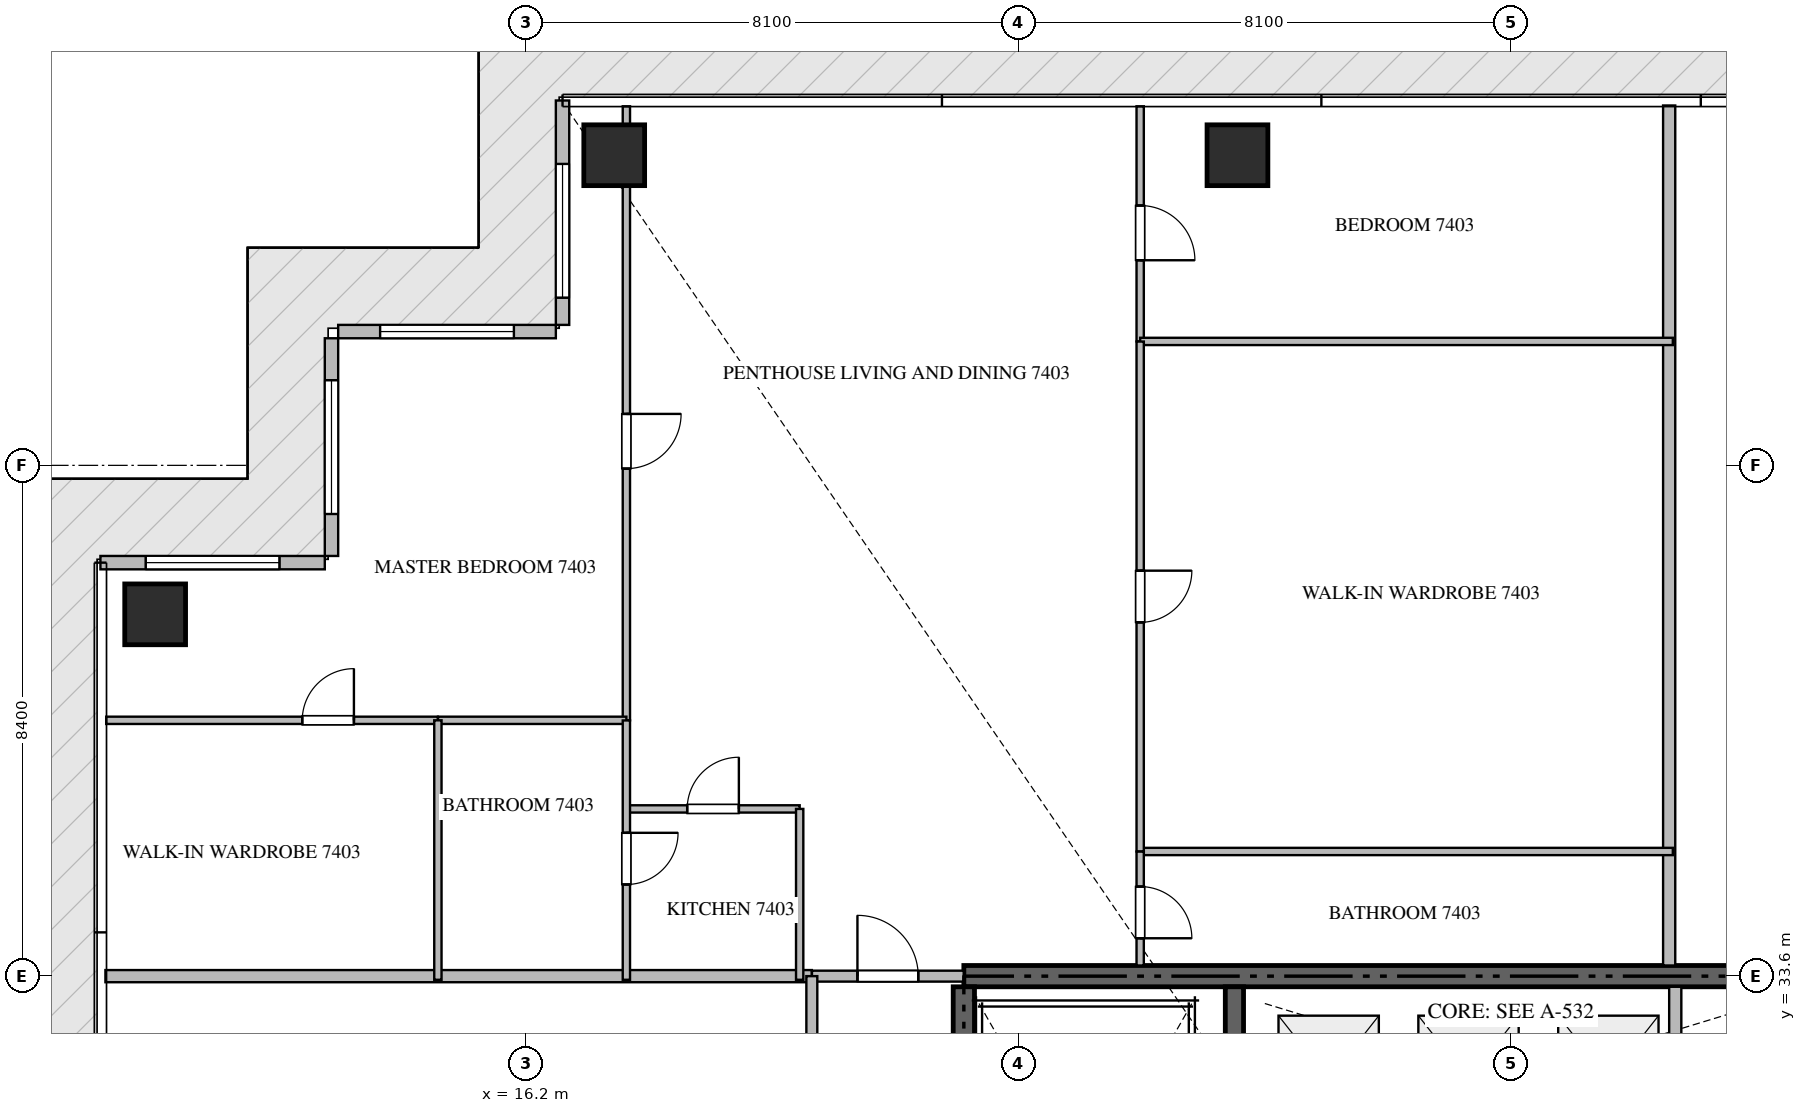
"""IFC4 building model, lengths in metres.
Left out: names, types, materials, properties, quantities, classifications, styles, units other than length and angle.
Written with IfcOpenShell. Run it as: python <this file> out.ifc"""

import sys

from ifc_helpers import new_model, si_unit, direction, frame, frame_2d, origin, origin_2d, place, context, subcontext, project, spatial, rectangle, extrude, source, transform, mapped, element, fill, save


model = new_model("IFC4")
c1 = context("Model", 3, precision=1e-05, world=origin(), true_north=direction((0.0, 1.0)))
c2 = subcontext(c1, "Body", "Model", "MODEL_VIEW")
j1 = project(units=[si_unit("LENGTHUNIT", "METRE"), si_unit("PLANEANGLEUNIT", "RADIAN")], contexts=[c1])
p1 = place(None, origin())
s1 = spatial("IfcSite", under=j1, at=p1, CompositionType="ELEMENT")
p2 = place(p1, origin())
s2 = spatial("IfcBuilding", under=s1, at=p2, CompositionType="ELEMENT")
p3 = place(p2, frame((0.0, 0.0, 297.5)))
s3 = spatial("IfcBuildingStorey", under=s2, at=p3, CompositionType="ELEMENT", Elevation=297.5)
p4 = place(p3, frame((41.4, 33.6, -0.26), z_axis=(0.0, 0.0, 1.0), x_axis=(-1.0, 0.0, 0.0)))
e1 = element("IfcWall", 1, at=p4, inside=s3, PredefinedType="SHEAR", context=c2, shape_type="SweptSolid", body=[
    extrude(rectangle(XDim=18.0, YDim=0.35, at=frame_2d((9.0, 0.0))), origin(), (0.0, 0.0, 1.0), 4.048),
])
p5 = place(p3, frame((23.4, 24.25, -0.26), z_axis=(0.0, 0.0, 1.0), x_axis=(0.0, 1.0, 0.0)))
e2 = element("IfcWall", 2, at=p5, inside=s3, PredefinedType="SHEAR", context=c2, shape_type="SweptSolid", body=[
    extrude(rectangle(XDim=9.175, YDim=0.35, at=frame_2d((4.587, 0.0))), origin(), (0.0, 0.0, 1.0), 4.048),
])
p6 = place(p3, frame((27.85, 23.55, -0.26), z_axis=(0.0, 0.0, 1.0), x_axis=(0.0, 1.0, 0.0)))
e3 = element("IfcWall", 3, at=p6, inside=s3, PredefinedType="SHEAR", context=c2, shape_type="SweptSolid", body=[
    extrude(rectangle(XDim=9.875, YDim=0.3, at=frame_2d((4.938, 0.0))), origin(), (0.0, 0.0, 1.0), 4.048),
])
m1 = source(origin(), c2, "Body", "SweptSolid", [
    extrude(rectangle(XDim=1.0, YDim=1.0, at=origin_2d()), origin(), (0.0, 0.0, 1.0), 4.05),
])
for number, where, z_axis, x_axis in (
    (4, (17.65, 47.1, -0.26), (0.0, 0.0, 1.0), (1.0, 0.0, 0.0)),
    (5, (27.9, 47.1, -0.26), (0.0, 0.0, 1.0), (1.0, 0.0, 0.0)),
    (6, (10.1, 39.55, -0.26), (0.0, 0.0, 1.0), (1.0, 0.0, 0.0)),
):
    element("IfcColumn", number, at=place(p3, frame(where, z_axis=z_axis, x_axis=x_axis)), inside=s3, PredefinedType="COLUMN", context=c2, shape_type="MappedRepresentation", body=[
        mapped(m1, transform((0.0, 0.0, 0.0), scale=1.0)),
    ])
p7 = place(p3, frame((16.8, 48.0, 0.0), z_axis=(0.0, 0.0, 1.0), x_axis=(0.0, -1.0, 0.0)))
e7 = element("IfcWall", 7, at=p7, inside=s3, PredefinedType="ELEMENTEDWALL", context=c2, shape_type="SweptSolid", body=[
    extrude(rectangle(XDim=3.69, YDim=0.22, at=frame_2d((1.845, 0.0))), origin(), (0.0, 0.0, 1.0), 3.775),
])
p8 = place(p7, frame((1.043, 0.0, 0.65)))
e8 = element("IfcOpeningElement", 8, at=p8, cuts=e7, PredefinedType="OPENING", context=c2, shape_type="SweptSolid", body=[
    extrude(rectangle(XDim=2.2, YDim=2.4, at=frame_2d((1.1, 1.2))), frame((0.0, 0.12, 0.0), z_axis=(0.0, -1.0, 0.0), x_axis=(1.0, 0.0, 0.0)), (0.0, 0.0, 1.0), 0.24),
])
p9 = place(p3, frame((16.69, 44.2, 0.0), z_axis=(0.0, 0.0, 1.0), x_axis=(-1.0, 0.0, 0.0)))
e9 = element("IfcWall", 9, at=p9, inside=s3, PredefinedType="ELEMENTEDWALL", context=c2, shape_type="SweptSolid", body=[
    extrude(rectangle(XDim=3.58, YDim=0.22, at=frame_2d((1.79, 0.0))), origin(), (0.0, 0.0, 1.0), 3.775),
])
p10 = place(p9, frame((0.69, 0.0, 0.65)))
e10 = element("IfcOpeningElement", 10, at=p10, cuts=e9, PredefinedType="OPENING", context=c2, shape_type="SweptSolid", body=[
    extrude(rectangle(XDim=2.2, YDim=2.4, at=frame_2d((1.1, 1.2))), frame((0.0, 0.12, 0.0), z_axis=(0.0, -1.0, 0.0), x_axis=(1.0, 0.0, 0.0)), (0.0, 0.0, 1.0), 0.24),
])
p11 = place(p3, frame((13.0, 44.09, 0.0), z_axis=(0.0, 0.0, 1.0), x_axis=(0.0, -1.0, 0.0)))
e11 = element("IfcWall", 11, at=p11, inside=s3, PredefinedType="ELEMENTEDWALL", context=c2, shape_type="SweptSolid", body=[
    extrude(rectangle(XDim=3.58, YDim=0.22, at=frame_2d((1.79, 0.0))), origin(), (0.0, 0.0, 1.0), 3.775),
])
p12 = place(p11, frame((0.69, 0.0, 0.65)))
e12 = element("IfcOpeningElement", 12, at=p12, cuts=e11, PredefinedType="OPENING", context=c2, shape_type="SweptSolid", body=[
    extrude(rectangle(XDim=2.2, YDim=2.4, at=frame_2d((1.1, 1.2))), frame((0.0, 0.12, 0.0), z_axis=(0.0, -1.0, 0.0), x_axis=(1.0, 0.0, 0.0)), (0.0, 0.0, 1.0), 0.24),
])
p13 = place(p3, frame((12.89, 40.4, 0.0), z_axis=(0.0, 0.0, 1.0), x_axis=(-1.0, 0.0, 0.0)))
e13 = element("IfcWall", 13, at=p13, inside=s3, PredefinedType="ELEMENTEDWALL", context=c2, shape_type="SweptSolid", body=[
    extrude(rectangle(XDim=3.69, YDim=0.22, at=frame_2d((1.845, 0.0))), origin(), (0.0, 0.0, 1.0), 3.775),
])
p14 = place(p13, frame((0.745, 0.0, 0.65)))
e14 = element("IfcOpeningElement", 14, at=p14, cuts=e13, PredefinedType="OPENING", context=c2, shape_type="SweptSolid", body=[
    extrude(rectangle(XDim=2.2, YDim=2.4, at=frame_2d((1.1, 1.2))), frame((0.0, 0.12, 0.0), z_axis=(0.0, -1.0, 0.0), x_axis=(1.0, 0.0, 0.0)), (0.0, 0.0, 1.0), 0.24),
])
p15 = place(p3, frame((35.1, 30.75, 0.0), z_axis=(0.0, 0.0, 1.0), x_axis=(0.0, 1.0, 0.0)))
e15 = element("IfcWall", 15, at=p15, inside=s3, PredefinedType="STANDARD", context=c2, shape_type="SweptSolid", body=[
    extrude(rectangle(XDim=2.675, YDim=0.2, at=frame_2d((1.337, 0.0))), origin(), (0.0, 0.0, 1.0), 3.79),
])
p16 = place(p3, frame((35.0, 33.775, 0.0), z_axis=(0.0, 0.0, 1.0), x_axis=(0.0, 1.0, 0.0)))
e16 = element("IfcWall", 16, at=p16, inside=s3, PredefinedType="PARTITIONING", context=c2, shape_type="SweptSolid", body=[
    extrude(rectangle(XDim=14.143, YDim=0.2, at=frame_2d((7.072, 0.0))), origin(), (0.0, 0.0, 1.0), 3.79),
])
p17 = place(p3, frame((9.282, 33.6, 0.0), z_axis=(0.0, 0.0, 1.0), x_axis=(1.0, 0.0, 0.0)))
e17 = element("IfcWall", 17, at=p17, inside=s3, PredefinedType="PARTITIONING", context=c2, shape_type="SweptSolid", body=[
    extrude(rectangle(XDim=11.618, YDim=0.2, at=frame_2d((5.809, 0.0))), origin(), (0.0, 0.0, 1.0), 3.79),
])
p18 = place(p3, frame((20.902, 33.6, 0.0), z_axis=(0.0, 0.0, 1.0), x_axis=(1.0, 0.0, 0.0)))
e18 = element("IfcWall", 18, at=p18, inside=s3, PredefinedType="PARTITIONING", context=c2, shape_type="SweptSolid", body=[
    extrude(rectangle(XDim=2.496, YDim=0.18, at=frame_2d((1.248, 0.0))), origin(), (0.0, 0.0, 1.0), 3.79),
])
p19 = place(p18, frame((0.748, 0.0, 0.0)))
e19 = element("IfcOpeningElement", 19, at=p19, cuts=e18, PredefinedType="OPENING", context=c2, shape_type="SweptSolid", body=[
    extrude(rectangle(XDim=1.0, YDim=2.15, at=frame_2d((0.5, 1.075))), frame((0.0, 0.1, 0.0), z_axis=(0.0, -1.0, 0.0), x_axis=(1.0, 0.0, 0.0)), (0.0, 0.0, 1.0), 0.2),
])
p20 = place(p3, frame((20.9, 16.8, 0.0), z_axis=(0.0, 0.0, 1.0), x_axis=(0.0, 1.0, 0.0)))
e20 = element("IfcWall", 20, at=p20, inside=s3, PredefinedType="PARTITIONING", context=c2, shape_type="SweptSolid", body=[
    extrude(rectangle(XDim=16.8, YDim=0.18, at=frame_2d((8.4, 0.0))), origin(), (0.0, 0.0, 1.0), 3.79),
])
p21 = place(p20, frame((14.5, 0.0, 0.0)))
e21 = element("IfcOpeningElement", 21, at=p21, cuts=e20, PredefinedType="OPENING", context=c2, shape_type="SweptSolid", body=[
    extrude(rectangle(XDim=1.0, YDim=2.15, at=frame_2d((0.5, 1.075))), frame((0.0, 0.1, 0.0), z_axis=(0.0, -1.0, 0.0), x_axis=(1.0, 0.0, 0.0)), (0.0, 0.0, 1.0), 0.2),
])
p22 = place(p3, frame((17.85, 36.35, 0.0), z_axis=(0.0, 0.0, 1.0), x_axis=(1.0, 0.0, 0.0)))
e22 = element("IfcWall", 22, at=p22, inside=s3, PredefinedType="PARTITIONING", context=c2, shape_type="SweptSolid", body=[
    extrude(rectangle(XDim=2.85, YDim=0.12, at=frame_2d((1.425, 0.0))), origin(), (0.0, 0.0, 1.0), 3.472),
])
p23 = place(p22, frame((1.0, 0.0, 0.0)))
e23 = element("IfcOpeningElement", 23, at=p23, cuts=e22, PredefinedType="OPENING", context=c2, shape_type="SweptSolid", body=[
    extrude(rectangle(XDim=0.85, YDim=2.1, at=frame_2d((0.425, 1.05))), frame((0.0, 0.07, 0.0), z_axis=(0.0, -1.0, 0.0), x_axis=(1.0, 0.0, 0.0)), (0.0, 0.0, 1.0), 0.14),
])
p24 = place(p3, frame((20.7, 36.35, 0.0), z_axis=(0.0, 0.0, 1.0), x_axis=(0.0, -1.0, 0.0)))
e24 = element("IfcWall", 24, at=p24, inside=s3, PredefinedType="PARTITIONING", context=c2, shape_type="SweptSolid", body=[
    extrude(rectangle(XDim=2.81, YDim=0.12, at=frame_2d((1.405, 0.0))), origin(), (0.0, 0.0, 1.0), 3.79),
])
p25 = place(p3, frame((17.85, 47.905, 0.0), z_axis=(0.0, 0.0, 1.0), x_axis=(0.0, -1.0, 0.0)))
e25 = element("IfcWall", 25, at=p25, inside=s3, PredefinedType="PARTITIONING", context=c2, shape_type="SweptSolid", body=[
    extrude(rectangle(XDim=10.098, YDim=0.12, at=frame_2d((5.049, 0.0))), origin(), (0.0, 0.0, 1.0), 3.292),
])
p26 = place(p25, frame((5.059, 0.0, 0.0)))
e26 = element("IfcOpeningElement", 26, at=p26, cuts=e25, PredefinedType="OPENING", context=c2, shape_type="SweptSolid", body=[
    extrude(rectangle(XDim=0.9, YDim=2.1, at=frame_2d((0.45, 1.05))), frame((0.0, 0.07, 0.0), z_axis=(0.0, -1.0, 0.0), x_axis=(1.0, 0.0, 0.0)), (0.0, 0.0, 1.0), 0.14),
])
p27 = place(p3, frame((9.295, 37.807, 0.0), z_axis=(0.0, 0.0, 1.0), x_axis=(1.0, 0.0, 0.0)))
e27 = element("IfcWall", 27, at=p27, inside=s3, PredefinedType="PARTITIONING", context=c2, shape_type="SweptSolid", body=[
    extrude(rectangle(XDim=5.455, YDim=0.12, at=frame_2d((2.728, 0.0))), origin(), (0.0, 0.0, 1.0), 3.79),
])
p28 = place(p27, frame((3.224, 0.0, 0.0)))
e28 = element("IfcOpeningElement", 28, at=p28, cuts=e27, PredefinedType="OPENING", context=c2, shape_type="SweptSolid", body=[
    extrude(rectangle(XDim=0.85, YDim=2.1, at=frame_2d((0.425, 1.05))), frame((0.0, 0.07, 0.0), z_axis=(0.0, -1.0, 0.0), x_axis=(1.0, 0.0, 0.0)), (0.0, 0.0, 1.0), 0.14),
])
p29 = place(p3, frame((14.752, 37.807, 0.0), z_axis=(0.0, 0.0, 1.0), x_axis=(1.0, 0.0, 0.0)))
e29 = element("IfcWall", 29, at=p29, inside=s3, PredefinedType="PARTITIONING", context=c2, shape_type="SweptSolid", body=[
    extrude(rectangle(XDim=3.098, YDim=0.12, at=frame_2d((1.549, 0.0))), origin(), (0.0, 0.0, 1.0), 3.79),
])
p30 = place(p3, frame((14.75, 37.807, 0.0), z_axis=(0.0, 0.0, 1.0), x_axis=(0.0, -1.0, 0.0)))
e30 = element("IfcWall", 30, at=p30, inside=s3, PredefinedType="PARTITIONING", context=c2, shape_type="SweptSolid", body=[
    extrude(rectangle(XDim=4.267, YDim=0.12, at=frame_2d((2.133, 0.0))), origin(), (0.0, 0.0, 1.0), 3.79),
])
p31 = place(p3, frame((17.85, 37.805, 0.0), z_axis=(0.0, 0.0, 1.0), x_axis=(0.0, -1.0, 0.0)))
e31 = element("IfcWall", 31, at=p31, inside=s3, PredefinedType="PARTITIONING", context=c2, shape_type="SweptSolid", body=[
    extrude(rectangle(XDim=4.265, YDim=0.12, at=frame_2d((2.132, 0.0))), origin(), (0.0, 0.0, 1.0), 3.372),
])
p32 = place(p31, frame((1.848, 0.0, 0.0)))
e32 = element("IfcOpeningElement", 32, at=p32, cuts=e31, PredefinedType="OPENING", context=c2, shape_type="SweptSolid", body=[
    extrude(rectangle(XDim=0.85, YDim=2.1, at=frame_2d((0.425, 1.05))), frame((0.0, 0.07, 0.0), z_axis=(0.0, -1.0, 0.0), x_axis=(1.0, 0.0, 0.0)), (0.0, 0.0, 1.0), 0.14),
])
p33 = place(p3, frame((26.3, 47.905, 0.0), z_axis=(0.0, 0.0, 1.0), x_axis=(0.0, -1.0, 0.0)))
e33 = element("IfcWall", 33, at=p33, inside=s3, PredefinedType="PARTITIONING", context=c2, shape_type="SweptSolid", body=[
    extrude(rectangle(XDim=3.867, YDim=0.12, at=frame_2d((1.934, 0.0))), origin(), (0.0, 0.0, 1.0), 3.79),
])
p34 = place(p33, frame((1.632, 0.0, 0.0)))
e34 = element("IfcOpeningElement", 34, at=p34, cuts=e33, PredefinedType="OPENING", context=c2, shape_type="SweptSolid", body=[
    extrude(rectangle(XDim=0.9, YDim=2.1, at=frame_2d((0.45, 1.05))), frame((0.0, 0.07, 0.0), z_axis=(0.0, -1.0, 0.0), x_axis=(1.0, 0.0, 0.0)), (0.0, 0.0, 1.0), 0.14),
])
for number, where, z_axis, x_axis in (
    (35, (26.3, 44.038, 0.0), (0.0, 0.0, 1.0), (1.0, 0.0, 0.0)),
    (36, (26.3, 35.65, 0.0), (0.0, 0.0, 1.0), (1.0, 0.0, 0.0)),
):
    element("IfcWall", number, at=place(p3, frame(where, z_axis=z_axis, x_axis=x_axis)), inside=s3, PredefinedType="PARTITIONING", context=c2, shape_type="SweptSolid", body=[
        extrude(rectangle(XDim=8.76, YDim=0.12, at=frame_2d((4.38, 0.0))), origin(), (0.0, 0.0, 1.0), 3.79),
    ])
p35 = place(p3, frame((26.3, 44.036, 0.0), z_axis=(0.0, 0.0, 1.0), x_axis=(0.0, -1.0, 0.0)))
e37 = element("IfcWall", 37, at=p35, inside=s3, PredefinedType="PARTITIONING", context=c2, shape_type="SweptSolid", body=[
    extrude(rectangle(XDim=8.386, YDim=0.12, at=frame_2d((4.193, 0.0))), origin(), (0.0, 0.0, 1.0), 3.79),
])
p36 = place(p35, frame((3.768, 0.0, 0.0)))
e38 = element("IfcOpeningElement", 38, at=p36, cuts=e37, PredefinedType="OPENING", context=c2, shape_type="SweptSolid", body=[
    extrude(rectangle(XDim=0.85, YDim=2.1, at=frame_2d((0.425, 1.05))), frame((0.0, 0.07, 0.0), z_axis=(0.0, -1.0, 0.0), x_axis=(1.0, 0.0, 0.0)), (0.0, 0.0, 1.0), 0.14),
])
p37 = place(p3, frame((26.3, 35.648, 0.0), z_axis=(0.0, 0.0, 1.0), x_axis=(0.0, -1.0, 0.0)))
e39 = element("IfcWall", 39, at=p37, inside=s3, PredefinedType="PARTITIONING", context=c2, shape_type="SweptSolid", body=[
    extrude(rectangle(XDim=1.873, YDim=0.12, at=frame_2d((0.937, 0.0))), origin(), (0.0, 0.0, 1.0), 3.79),
])
p38 = place(p37, frame((0.575, 0.0, 0.0)))
e40 = element("IfcOpeningElement", 40, at=p38, cuts=e39, PredefinedType="OPENING", context=c2, shape_type="SweptSolid", body=[
    extrude(rectangle(XDim=0.85, YDim=2.1, at=frame_2d((0.425, 1.05))), frame((0.0, 0.07, 0.0), z_axis=(0.0, -1.0, 0.0), x_axis=(1.0, 0.0, 0.0)), (0.0, 0.0, 1.0), 0.14),
])
m2 = source(origin(), c2, "Body", "SweptSolid", [
    extrude(rectangle(XDim=2.2, YDim=2.4, at=frame_2d((1.1, 1.2))), frame((0.0, 0.03, 0.0), z_axis=(0.0, -1.0, 0.0), x_axis=(1.0, 0.0, 0.0)), (0.0, 0.0, 1.0), 0.06),
])
p39 = place(p8, origin())
e41 = element("IfcWindow", 41, at=p39, inside=s3, PartitioningType="SINGLE_PANEL", PredefinedType="WINDOW", context=c2, shape_type="MappedRepresentation", body=[
    mapped(m2, transform((0.0, 0.0, 0.0), scale=1.0)),
])
fill(e8, e41)
p40 = place(p10, origin())
e42 = element("IfcWindow", 42, at=p40, inside=s3, PartitioningType="SINGLE_PANEL", PredefinedType="WINDOW", context=c2, shape_type="MappedRepresentation", body=[
    mapped(m2, transform((0.0, 0.0, 0.0), scale=1.0)),
])
fill(e10, e42)
p41 = place(p12, origin())
e43 = element("IfcWindow", 43, at=p41, inside=s3, PartitioningType="SINGLE_PANEL", PredefinedType="WINDOW", context=c2, shape_type="MappedRepresentation", body=[
    mapped(m2, transform((0.0, 0.0, 0.0), scale=1.0)),
])
fill(e12, e43)
p42 = place(p14, origin())
e44 = element("IfcWindow", 44, at=p42, inside=s3, PartitioningType="SINGLE_PANEL", PredefinedType="WINDOW", context=c2, shape_type="MappedRepresentation", body=[
    mapped(m2, transform((0.0, 0.0, 0.0), scale=1.0)),
])
fill(e14, e44)
m3 = source(origin(), c2, "Body", "SweptSolid", [
    extrude(rectangle(XDim=1.0, YDim=2.15, at=frame_2d((0.5, 1.075))), frame((0.0, 0.025, 0.0), z_axis=(0.0, -1.0, 0.0), x_axis=(1.0, 0.0, 0.0)), (0.0, 0.0, 1.0), 0.05),
])
p43 = place(p19, origin())
e45 = element("IfcDoor", 45, at=p43, inside=s3, OperationType="SINGLE_SWING_LEFT", PredefinedType="DOOR", context=c2, shape_type="MappedRepresentation", body=[
    mapped(m3, transform((0.0, 0.0, 0.0), scale=1.0)),
])
fill(e19, e45)
m4 = source(origin(), c2, "Body", "SweptSolid", [
    extrude(rectangle(XDim=0.85, YDim=2.1, at=frame_2d((0.425, 1.05))), frame((0.0, 0.025, 0.0), z_axis=(0.0, -1.0, 0.0), x_axis=(1.0, 0.0, 0.0)), (0.0, 0.0, 1.0), 0.05),
])
p44 = place(p23, origin())
e46 = element("IfcDoor", 46, at=p44, inside=s3, OperationType="SINGLE_SWING_RIGHT", PredefinedType="DOOR", context=c2, shape_type="MappedRepresentation", body=[
    mapped(m4, transform((0.0, 0.0, 0.0), scale=1.0)),
])
fill(e23, e46)
m5 = source(origin(), c2, "Body", "SweptSolid", [
    extrude(rectangle(XDim=0.9, YDim=2.1, at=frame_2d((0.45, 1.05))), frame((0.0, 0.025, 0.0), z_axis=(0.0, -1.0, 0.0), x_axis=(1.0, 0.0, 0.0)), (0.0, 0.0, 1.0), 0.05),
])
p45 = place(p26, origin())
e47 = element("IfcDoor", 47, at=p45, inside=s3, OperationType="SINGLE_SWING_LEFT", PredefinedType="DOOR", context=c2, shape_type="MappedRepresentation", body=[
    mapped(m5, transform((0.0, 0.0, 0.0), scale=1.0)),
])
fill(e26, e47)
p46 = place(p28, origin())
e48 = element("IfcDoor", 48, at=p46, inside=s3, OperationType="SINGLE_SWING_RIGHT", PredefinedType="DOOR", context=c2, shape_type="MappedRepresentation", body=[
    mapped(m4, transform((0.0, 0.0, 0.0), scale=1.0)),
])
fill(e28, e48)
p47 = place(p32, origin())
e49 = element("IfcDoor", 49, at=p47, inside=s3, OperationType="SINGLE_SWING_LEFT", PredefinedType="DOOR", context=c2, shape_type="MappedRepresentation", body=[
    mapped(m4, transform((0.0, 0.0, 0.0), scale=1.0)),
])
fill(e32, e49)
p48 = place(p34, origin())
e50 = element("IfcDoor", 50, at=p48, inside=s3, OperationType="SINGLE_SWING_RIGHT", PredefinedType="DOOR", context=c2, shape_type="MappedRepresentation", body=[
    mapped(m5, transform((0.0, 0.0, 0.0), scale=1.0)),
])
fill(e34, e50)
p49 = place(p36, origin())
e51 = element("IfcDoor", 51, at=p49, inside=s3, OperationType="SINGLE_SWING_LEFT", PredefinedType="DOOR", context=c2, shape_type="MappedRepresentation", body=[
    mapped(m4, transform((0.0, 0.0, 0.0), scale=1.0)),
])
fill(e38, e51)
p50 = place(p38, origin())
e52 = element("IfcDoor", 52, at=p50, inside=s3, OperationType="SINGLE_SWING_RIGHT", PredefinedType="DOOR", context=c2, shape_type="MappedRepresentation", body=[
    mapped(m4, transform((0.0, 0.0, 0.0), scale=1.0)),
])
fill(e40, e52)
save(model, sys.argv[1])
